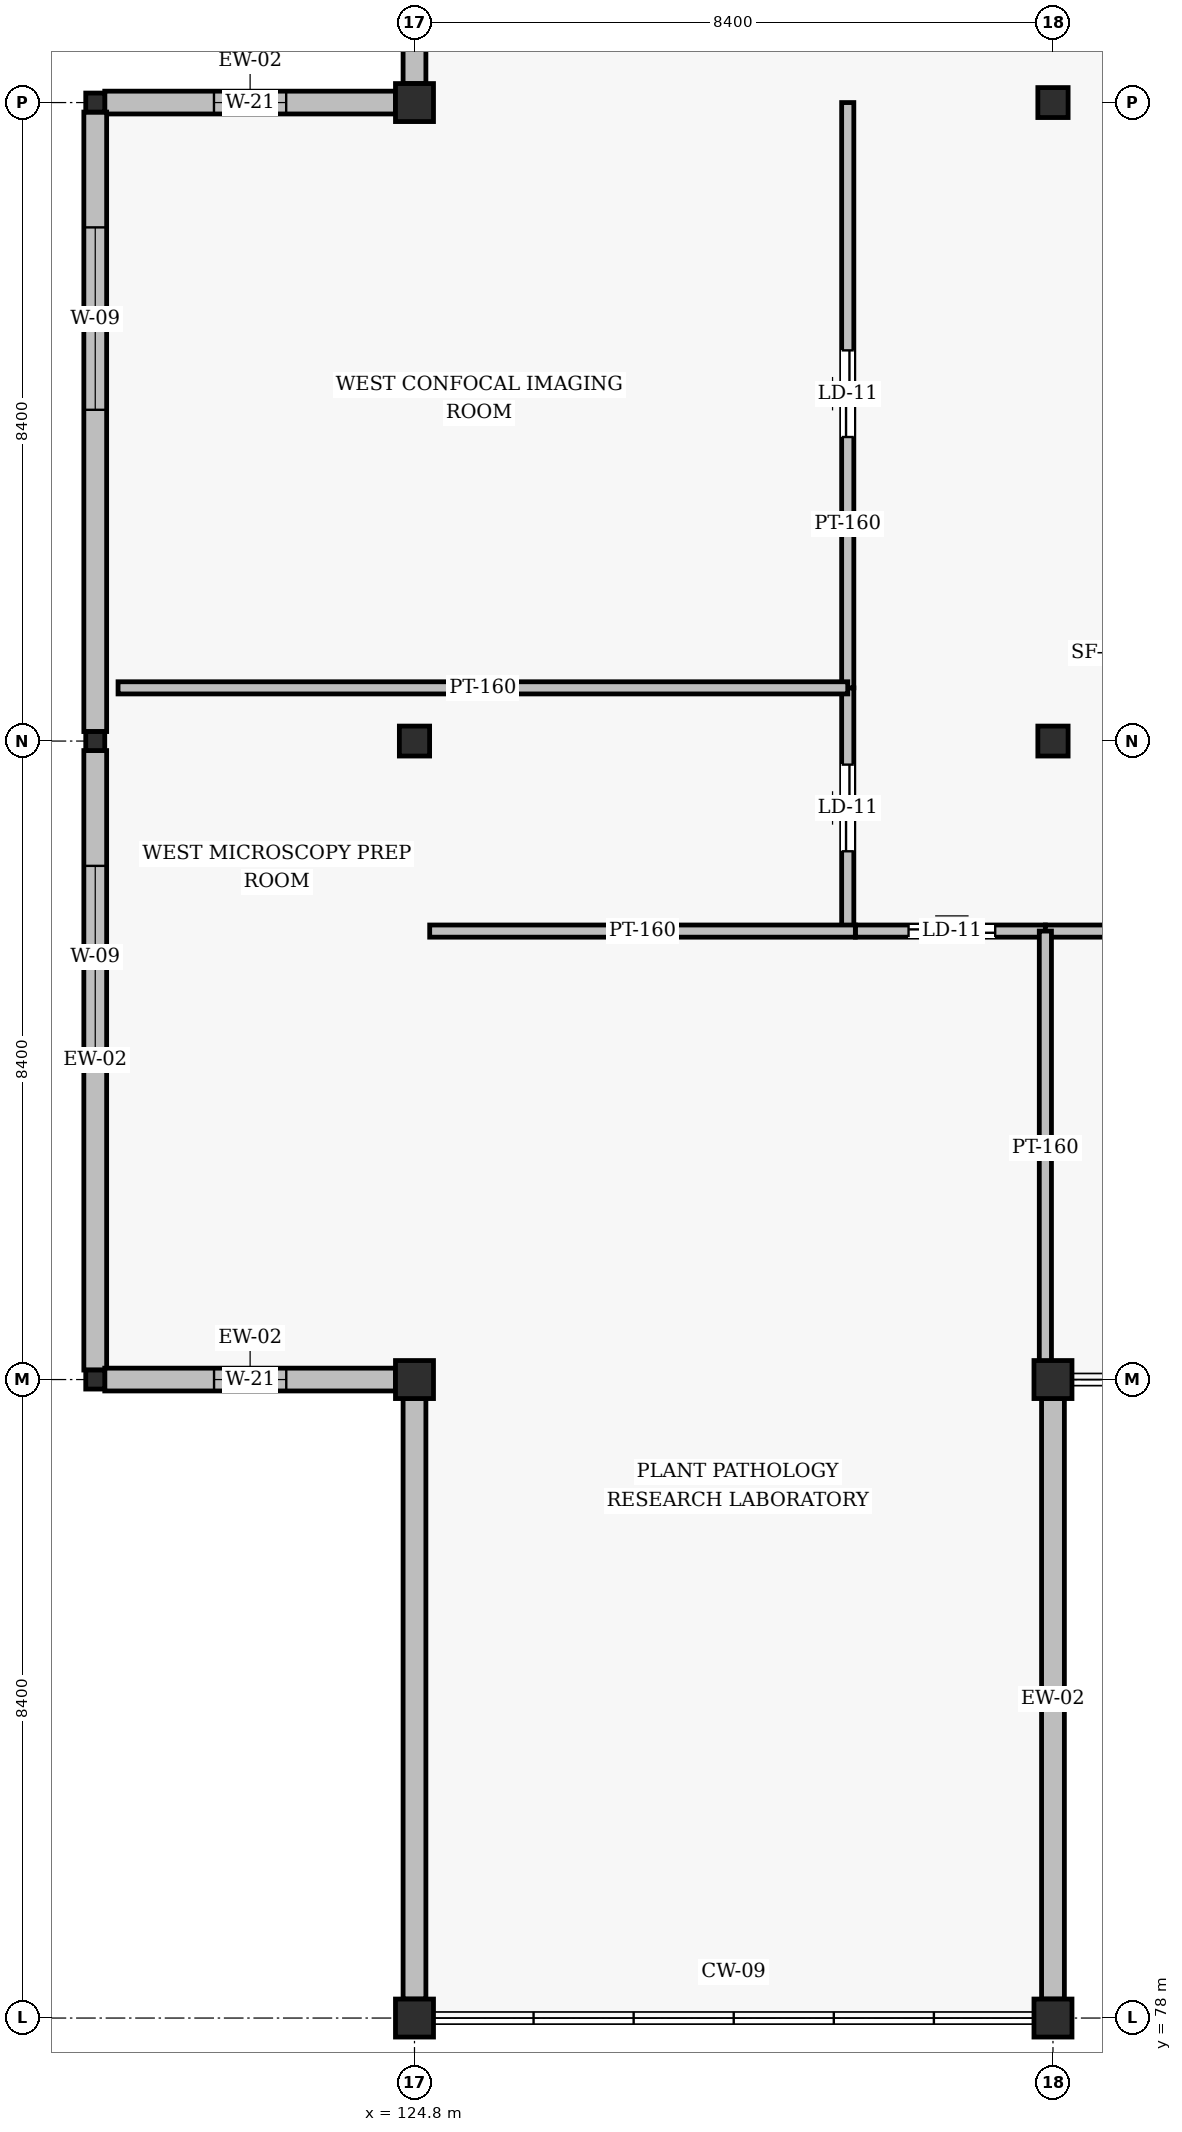
"""IFC4 building model, lengths in metres.
Left out: names, types, materials, properties, quantities, classifications, styles, units other than length and angle.
Written with IfcOpenShell. Run it as: python <this file> out.ifc"""

import sys

from ifc_helpers import new_model, si_unit, direction, frame, frame_2d, origin, origin_2d, place, context, subcontext, project, spatial, rectangle, hollow_rectangle, i_section, extrude, element, fill, save


model = new_model("IFC4")
c1 = context("Model", 3, precision=1e-05, world=origin(), true_north=direction((0.0, 1.0)))
c2 = subcontext(c1, "Body", "Model", "MODEL_VIEW")
j1 = project(units=[si_unit("LENGTHUNIT", "METRE"), si_unit("PLANEANGLEUNIT", "RADIAN")], contexts=[c1])
p1 = place(None, origin())
s1 = spatial("IfcSite", under=j1, at=p1, CompositionType="ELEMENT")
p2 = place(p1, origin())
s2 = spatial("IfcBuilding", under=s1, at=p2, CompositionType="ELEMENT")
p3 = place(p2, frame((0.0, 0.0, 31.8)))
s3 = spatial("IfcBuildingStorey", under=s2, at=p3, CompositionType="ELEMENT", Elevation=31.8)
for number, where, z_axis, x_axis in (
    (1, (120.6, 86.4, 0.0), (0.0, 0.0, 1.0), (1.0, 0.0, 0.0)),
    (2, (120.6, 94.8, 0.0), (0.0, 0.0, 1.0), (1.0, 0.0, 0.0)),
    (3, (120.6, 103.2, 0.0), (0.0, 0.0, 1.0), (1.0, 0.0, 0.0)),
):
    element("IfcColumn", number, at=place(p3, frame(where, z_axis=z_axis, x_axis=x_axis)), inside=s3, PredefinedType="COLUMN", context=c2, shape_type="SweptSolid", body=[
        extrude(i_section(OverallWidth=0.25, OverallDepth=0.25, WebThickness=0.009, FlangeThickness=0.014, FilletRadius=0.016, at=origin_2d()), origin(), (0.0, 0.0, 1.0), 3.6),
    ])
p4 = place(p3, frame((124.8, 78.0, 0.0), z_axis=(0.0, 0.0, 1.0), x_axis=(1.0, 0.0, 0.0)))
e4 = element("IfcColumn", 4, at=p4, inside=s3, PredefinedType="COLUMN", context=c2, shape_type="SweptSolid", body=[
    extrude(hollow_rectangle(XDim=0.5, YDim=0.5, WallThickness=0.02, InnerFilletRadius=0.02, OuterFilletRadius=0.04, at=origin_2d()), origin(), (0.0, 0.0, 1.0), 3.576),
])
p5 = place(p3, frame((124.8, 86.4, 0.0), z_axis=(0.0, 0.0, 1.0), x_axis=(1.0, 0.0, 0.0)))
e5 = element("IfcColumn", 5, at=p5, inside=s3, PredefinedType="COLUMN", context=c2, shape_type="SweptSolid", body=[
    extrude(hollow_rectangle(XDim=0.5, YDim=0.5, WallThickness=0.02, InnerFilletRadius=0.02, OuterFilletRadius=0.04, at=origin_2d()), origin(), (0.0, 0.0, 1.0), 3.6),
])
p6 = place(p3, frame((124.8, 94.8, 0.0), z_axis=(0.0, 0.0, 1.0), x_axis=(1.0, 0.0, 0.0)))
e6 = element("IfcColumn", 6, at=p6, inside=s3, PredefinedType="COLUMN", context=c2, shape_type="SweptSolid", body=[
    extrude(i_section(OverallWidth=0.398, OverallDepth=0.394, WebThickness=0.011, FlangeThickness=0.018, FilletRadius=0.022, at=origin_2d()), origin(), (0.0, 0.0, 1.0), 3.6),
])
p7 = place(p3, frame((124.8, 103.2, 0.0), z_axis=(0.0, 0.0, 1.0), x_axis=(1.0, 0.0, 0.0)))
e7 = element("IfcColumn", 7, at=p7, inside=s3, PredefinedType="COLUMN", context=c2, shape_type="SweptSolid", body=[
    extrude(hollow_rectangle(XDim=0.5, YDim=0.5, WallThickness=0.02, InnerFilletRadius=0.02, OuterFilletRadius=0.04, at=origin_2d()), origin(), (0.0, 0.0, 1.0), 3.6),
])
p8 = place(p3, frame((133.2, 78.0, 0.0), z_axis=(0.0, 0.0, 1.0), x_axis=(1.0, 0.0, 0.0)))
e8 = element("IfcColumn", 8, at=p8, inside=s3, PredefinedType="COLUMN", context=c2, shape_type="SweptSolid", body=[
    extrude(hollow_rectangle(XDim=0.5, YDim=0.5, WallThickness=0.02, InnerFilletRadius=0.02, OuterFilletRadius=0.04, at=origin_2d()), origin(), (0.0, 0.0, 1.0), 3.576),
])
p9 = place(p3, frame((133.2, 86.4, 0.0), z_axis=(0.0, 0.0, 1.0), x_axis=(1.0, 0.0, 0.0)))
e9 = element("IfcColumn", 9, at=p9, inside=s3, PredefinedType="COLUMN", context=c2, shape_type="SweptSolid", body=[
    extrude(hollow_rectangle(XDim=0.5, YDim=0.5, WallThickness=0.02, InnerFilletRadius=0.02, OuterFilletRadius=0.04, at=origin_2d()), origin(), (0.0, 0.0, 1.0), 3.6),
])
for number, where, z_axis, x_axis in (
    (10, (133.2, 94.8, 0.0), (0.0, 0.0, 1.0), (1.0, 0.0, 0.0)),
    (11, (133.2, 103.2, 0.0), (0.0, 0.0, 1.0), (1.0, 0.0, 0.0)),
):
    element("IfcColumn", number, at=place(p3, frame(where, z_axis=z_axis, x_axis=x_axis)), inside=s3, PredefinedType="COLUMN", context=c2, shape_type="SweptSolid", body=[
        extrude(i_section(OverallWidth=0.398, OverallDepth=0.394, WebThickness=0.011, FlangeThickness=0.018, FilletRadius=0.022, at=origin_2d()), origin(), (0.0, 0.0, 1.0), 3.6),
    ])
for number, where, z_axis, x_axis in (
    (12, (124.8, 86.15, 0.0), (0.0, 0.0, 1.0), (0.0, -1.0, 0.0)),
    (13, (133.2, 78.25, 0.0), (0.0, 0.0, 1.0), (0.0, 1.0, 0.0)),
):
    element("IfcWall", number, at=place(p3, frame(where, z_axis=z_axis, x_axis=x_axis)), inside=s3, PredefinedType="SOLIDWALL", context=c2, shape_type="SweptSolid", body=[
        extrude(rectangle(XDim=7.9, YDim=0.3, at=frame_2d((3.95, 0.0))), origin(), (0.0, 0.0, 1.0), 2.795),
    ])
p10 = place(p3, frame((124.8, 114.95, 0.0), z_axis=(0.0, 0.0, 1.0), x_axis=(0.0, -1.0, 0.0)))
e14 = element("IfcWall", 14, at=p10, inside=s3, PredefinedType="SOLIDWALL", context=c2, shape_type="SweptSolid", body=[
    extrude(rectangle(XDim=11.5, YDim=0.3, at=frame_2d((5.75, 0.0))), origin(), (0.0, 0.0, 1.0), 2.503),
])
p11 = place(p3, frame((124.55, 103.2, 0.0), z_axis=(0.0, 0.0, 1.0), x_axis=(-1.0, 0.0, 0.0)))
e15 = element("IfcWall", 15, at=p11, inside=s3, PredefinedType="SOLIDWALL", context=c2, shape_type="SweptSolid", body=[
    extrude(rectangle(XDim=3.825, YDim=0.3, at=frame_2d((1.913, 0.0))), origin(), (0.0, 0.0, 1.0), 3.295),
])
p12 = place(p11, frame((1.438, 0.0, 0.95)))
e16 = element("IfcOpeningElement", 16, at=p12, cuts=e15, PredefinedType="OPENING", context=c2, shape_type="SweptSolid", body=[
    extrude(rectangle(XDim=0.95, YDim=1.75, at=frame_2d((0.475, 0.875))), frame((0.0, 0.16, 0.0), z_axis=(0.0, -1.0, 0.0), x_axis=(1.0, 0.0, 0.0)), (0.0, 0.0, 1.0), 0.32),
])
p13 = place(p3, frame((120.6, 103.075, 0.0), z_axis=(0.0, 0.0, 1.0), x_axis=(0.0, -1.0, 0.0)))
e17 = element("IfcWall", 17, at=p13, inside=s3, PredefinedType="SOLIDWALL", context=c2, shape_type="SweptSolid", body=[
    extrude(rectangle(XDim=8.15, YDim=0.3, at=frame_2d((4.075, 0.0))), origin(), (0.0, 0.0, 1.0), 3.295),
])
p14 = place(p13, frame((1.517, 0.0, 0.85)))
e18 = element("IfcOpeningElement", 18, at=p14, cuts=e17, PredefinedType="OPENING", context=c2, shape_type="SweptSolid", body=[
    extrude(rectangle(XDim=2.4, YDim=2.1, at=frame_2d((1.2, 1.05))), frame((0.0, 0.16, 0.0), z_axis=(0.0, -1.0, 0.0), x_axis=(1.0, 0.0, 0.0)), (0.0, 0.0, 1.0), 0.32),
])
p15 = place(p3, frame((120.6, 94.675, 0.0), z_axis=(0.0, 0.0, 1.0), x_axis=(0.0, -1.0, 0.0)))
e19 = element("IfcWall", 19, at=p15, inside=s3, PredefinedType="SOLIDWALL", context=c2, shape_type="SweptSolid", body=[
    extrude(rectangle(XDim=8.15, YDim=0.3, at=frame_2d((4.075, 0.0))), origin(), (0.0, 0.0, 1.0), 3.295),
])
p16 = place(p15, frame((1.517, 0.0, 0.85)))
e20 = element("IfcOpeningElement", 20, at=p16, cuts=e19, PredefinedType="OPENING", context=c2, shape_type="SweptSolid", body=[
    extrude(rectangle(XDim=2.4, YDim=2.1, at=frame_2d((1.2, 1.05))), frame((0.0, 0.16, 0.0), z_axis=(0.0, -1.0, 0.0), x_axis=(1.0, 0.0, 0.0)), (0.0, 0.0, 1.0), 0.32),
])
p17 = place(p3, frame((120.725, 86.4, 0.0), z_axis=(0.0, 0.0, 1.0), x_axis=(1.0, 0.0, 0.0)))
e21 = element("IfcWall", 21, at=p17, inside=s3, PredefinedType="SOLIDWALL", context=c2, shape_type="SweptSolid", body=[
    extrude(rectangle(XDim=3.825, YDim=0.3, at=frame_2d((1.913, 0.0))), origin(), (0.0, 0.0, 1.0), 3.295),
])
p18 = place(p17, frame((1.438, 0.0, 0.95)))
e22 = element("IfcOpeningElement", 22, at=p18, cuts=e21, PredefinedType="OPENING", context=c2, shape_type="SweptSolid", body=[
    extrude(rectangle(XDim=0.95, YDim=1.75, at=frame_2d((0.475, 0.875))), frame((0.0, 0.16, 0.0), z_axis=(0.0, -1.0, 0.0), x_axis=(1.0, 0.0, 0.0)), (0.0, 0.0, 1.0), 0.32),
])
p19 = place(p3, frame((130.5, 92.3, 0.0), z_axis=(0.0, 0.0, 1.0), x_axis=(0.0, 1.0, 0.0)))
e23 = element("IfcWall", 23, at=p19, inside=s3, PredefinedType="PARTITIONING", context=c2, shape_type="SweptSolid", body=[
    extrude(rectangle(XDim=3.2, YDim=0.16, at=frame_2d((1.6, 0.0))), origin(), (0.0, 0.0, 1.0), 2.795),
])
p20 = place(p19, frame((1.05, 0.0, 0.0)))
e24 = element("IfcOpeningElement", 24, at=p20, cuts=e23, PredefinedType="OPENING", context=c2, shape_type="SweptSolid", body=[
    extrude(rectangle(XDim=1.14, YDim=2.12, at=frame_2d((0.57, 1.06))), frame((0.0, 0.09, 0.0), z_axis=(0.0, -1.0, 0.0), x_axis=(1.0, 0.0, 0.0)), (0.0, 0.0, 1.0), 0.18),
])
p21 = place(p3, frame((130.5, 95.5, 0.0), z_axis=(0.0, 0.0, 1.0), x_axis=(0.0, 1.0, 0.0)))
e25 = element("IfcWall", 25, at=p21, inside=s3, PredefinedType="PARTITIONING", context=c2, shape_type="SweptSolid", body=[
    extrude(rectangle(XDim=7.7, YDim=0.16, at=frame_2d((3.85, 0.0))), origin(), (0.0, 0.0, 1.0), 2.945),
])
p22 = place(p21, frame((3.3, 0.0, 0.0)))
e26 = element("IfcOpeningElement", 26, at=p22, cuts=e25, PredefinedType="OPENING", context=c2, shape_type="SweptSolid", body=[
    extrude(rectangle(XDim=1.14, YDim=2.12, at=frame_2d((0.57, 1.06))), frame((0.0, 0.09, 0.0), z_axis=(0.0, -1.0, 0.0), x_axis=(1.0, 0.0, 0.0)), (0.0, 0.0, 1.0), 0.18),
])
p23 = place(p3, frame((120.9, 95.5, 0.0), z_axis=(0.0, 0.0, 1.0), x_axis=(1.0, 0.0, 0.0)))
e27 = element("IfcWall", 27, at=p23, inside=s3, PredefinedType="PARTITIONING", context=c2, shape_type="SweptSolid", body=[
    extrude(rectangle(XDim=9.6, YDim=0.16, at=frame_2d((4.8, 0.0))), origin(), (0.0, 0.0, 1.0), 2.795),
])
p24 = place(p3, frame((130.6, 92.3, 0.0), z_axis=(0.0, 0.0, 1.0), x_axis=(1.0, 0.0, 0.0)))
e28 = element("IfcWall", 28, at=p24, inside=s3, PredefinedType="PARTITIONING", context=c2, shape_type="SweptSolid", body=[
    extrude(rectangle(XDim=2.5, YDim=0.16, at=frame_2d((1.25, 0.0))), origin(), (0.0, 0.0, 1.0), 3.295),
])
p25 = place(p24, frame((0.7, 0.0, 0.0)))
e29 = element("IfcOpeningElement", 29, at=p25, cuts=e28, PredefinedType="OPENING", context=c2, shape_type="SweptSolid", body=[
    extrude(rectangle(XDim=1.14, YDim=2.12, at=frame_2d((0.57, 1.06))), frame((0.0, 0.09, 0.0), z_axis=(0.0, -1.0, 0.0), x_axis=(1.0, 0.0, 0.0)), (0.0, 0.0, 1.0), 0.18),
])
p26 = place(p3, frame((133.1, 92.3, 0.0), z_axis=(0.0, 0.0, 1.0), x_axis=(1.0, 0.0, 0.0)))
e30 = element("IfcWall", 30, at=p26, inside=s3, PredefinedType="PARTITIONING", context=c2, shape_type="SweptSolid", body=[
    extrude(rectangle(XDim=16.9, YDim=0.16, at=frame_2d((8.45, 0.0))), origin(), (0.0, 0.0, 1.0), 2.795),
])
p27 = place(p26, frame((7.85, 0.0, 0.0)))
e31 = element("IfcOpeningElement", 31, at=p27, cuts=e30, PredefinedType="OPENING", context=c2, shape_type="SweptSolid", body=[
    extrude(rectangle(XDim=1.25, YDim=2.12, at=frame_2d((0.625, 1.06))), frame((0.0, 0.09, 0.0), z_axis=(0.0, -1.0, 0.0), x_axis=(1.0, 0.0, 0.0)), (0.0, 0.0, 1.0), 0.18),
])
p28 = place(p3, frame((125.0, 92.3, 0.0), z_axis=(0.0, 0.0, 1.0), x_axis=(1.0, 0.0, 0.0)))
e32 = element("IfcWall", 32, at=p28, inside=s3, PredefinedType="PARTITIONING", context=c2, shape_type="SweptSolid", body=[
    extrude(rectangle(XDim=5.6, YDim=0.16, at=frame_2d((2.8, 0.0))), origin(), (0.0, 0.0, 1.0), 3.295),
])
p29 = place(p3, frame((133.1, 86.6, 0.0), z_axis=(0.0, 0.0, 1.0), x_axis=(0.0, 1.0, 0.0)))
e33 = element("IfcWall", 33, at=p29, inside=s3, PredefinedType="PARTITIONING", context=c2, shape_type="SweptSolid", body=[
    extrude(rectangle(XDim=5.7, YDim=0.16, at=frame_2d((2.85, 0.0))), origin(), (0.0, 0.0, 1.0), 2.795),
])
p30 = place(p12, origin())
e34 = element("IfcWindow", 34, at=p30, inside=s3, PartitioningType="SINGLE_PANEL", PredefinedType="WINDOW", context=c2, shape_type="SweptSolid", body=[
    extrude(rectangle(XDim=0.95, YDim=1.75, at=frame_2d((0.475, 0.875))), frame((0.0, 0.03, 0.0), z_axis=(0.0, -1.0, 0.0), x_axis=(1.0, 0.0, 0.0)), (0.0, 0.0, 1.0), 0.06),
])
fill(e16, e34)
p31 = place(p14, origin())
e35 = element("IfcWindow", 35, at=p31, inside=s3, PartitioningType="SINGLE_PANEL", PredefinedType="WINDOW", context=c2, shape_type="SweptSolid", body=[
    extrude(rectangle(XDim=2.4, YDim=2.1, at=frame_2d((1.2, 1.05))), frame((0.0, 0.03, 0.0), z_axis=(0.0, -1.0, 0.0), x_axis=(1.0, 0.0, 0.0)), (0.0, 0.0, 1.0), 0.06),
])
fill(e18, e35)
p32 = place(p16, origin())
e36 = element("IfcWindow", 36, at=p32, inside=s3, PartitioningType="SINGLE_PANEL", PredefinedType="WINDOW", context=c2, shape_type="SweptSolid", body=[
    extrude(rectangle(XDim=2.4, YDim=2.1, at=frame_2d((1.2, 1.05))), frame((0.0, 0.03, 0.0), z_axis=(0.0, -1.0, 0.0), x_axis=(1.0, 0.0, 0.0)), (0.0, 0.0, 1.0), 0.06),
])
fill(e20, e36)
p33 = place(p18, origin())
e37 = element("IfcWindow", 37, at=p33, inside=s3, PartitioningType="SINGLE_PANEL", PredefinedType="WINDOW", context=c2, shape_type="SweptSolid", body=[
    extrude(rectangle(XDim=0.95, YDim=1.75, at=frame_2d((0.475, 0.875))), frame((0.0, 0.03, 0.0), z_axis=(0.0, -1.0, 0.0), x_axis=(1.0, 0.0, 0.0)), (0.0, 0.0, 1.0), 0.06),
])
fill(e22, e37)
p34 = place(p20, origin())
e38 = element("IfcDoor", 38, at=p34, inside=s3, OperationType="SINGLE_SWING_RIGHT", PredefinedType="DOOR", context=c2, shape_type="SweptSolid", body=[
    extrude(rectangle(XDim=1.14, YDim=2.12, at=frame_2d((0.57, 1.06))), frame((0.0, 0.025, 0.0), z_axis=(0.0, -1.0, 0.0), x_axis=(1.0, 0.0, 0.0)), (0.0, 0.0, 1.0), 0.05),
])
fill(e24, e38)
p35 = place(p22, origin())
e39 = element("IfcDoor", 39, at=p35, inside=s3, OperationType="SINGLE_SWING_RIGHT", PredefinedType="DOOR", context=c2, shape_type="SweptSolid", body=[
    extrude(rectangle(XDim=1.14, YDim=2.12, at=frame_2d((0.57, 1.06))), frame((0.0, 0.025, 0.0), z_axis=(0.0, -1.0, 0.0), x_axis=(1.0, 0.0, 0.0)), (0.0, 0.0, 1.0), 0.05),
])
fill(e26, e39)
p36 = place(p25, origin())
e40 = element("IfcDoor", 40, at=p36, inside=s3, OperationType="SINGLE_SWING_RIGHT", PredefinedType="DOOR", context=c2, shape_type="SweptSolid", body=[
    extrude(rectangle(XDim=1.14, YDim=2.12, at=frame_2d((0.57, 1.06))), frame((0.0, 0.025, 0.0), z_axis=(0.0, -1.0, 0.0), x_axis=(1.0, 0.0, 0.0)), (0.0, 0.0, 1.0), 0.05),
])
fill(e29, e40)
save(model, sys.argv[1])
